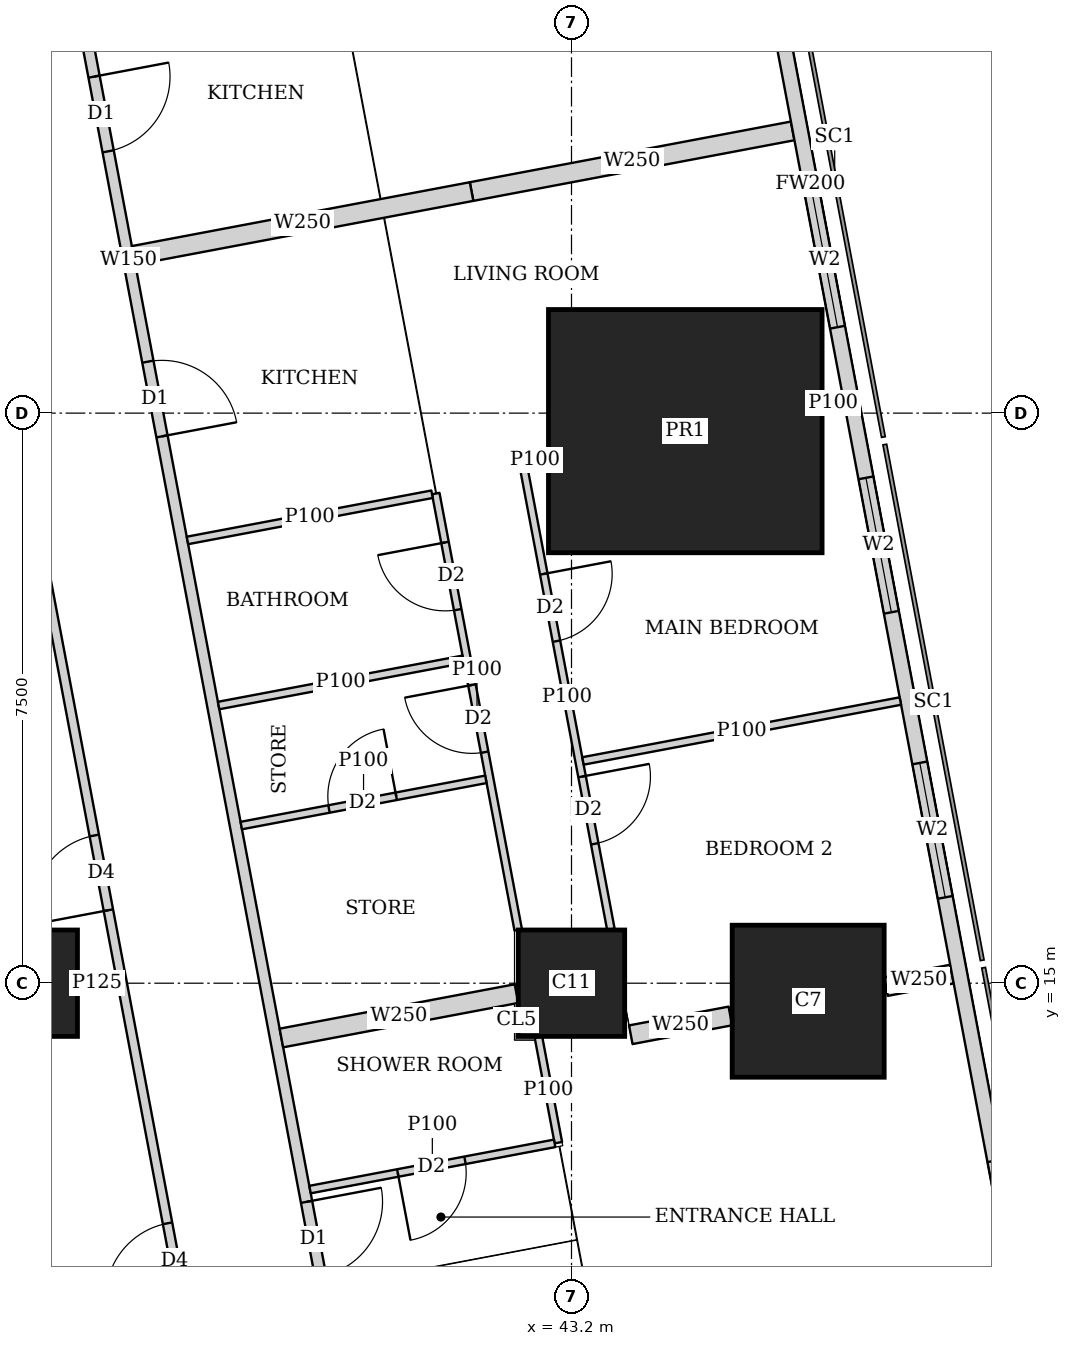
"""IFC4 building model, lengths in metres.
Left out: names, types, materials, properties, quantities, classifications, styles, units other than length and angle.
Written with IfcOpenShell. Run it as: python <this file> out.ifc"""

import sys

from ifc_helpers import new_model, si_unit, direction, frame, frame_2d, origin, origin_2d, place, context, subcontext, project, spatial, rectangle, extrude, element, fill, save


model = new_model("IFC4")
c1 = context("Model", 3, precision=1e-05, world=origin(), true_north=direction((0.0, 1.0)))
c2 = subcontext(c1, "Body", "Model", "MODEL_VIEW")
j1 = project(units=[si_unit("LENGTHUNIT", "METRE"), si_unit("PLANEANGLEUNIT", "RADIAN")], contexts=[c1])
p1 = place(None, origin())
s1 = spatial("IfcSite", under=j1, at=p1, CompositionType="ELEMENT")
p2 = place(p1, origin())
s2 = spatial("IfcBuilding", under=s1, at=p2, CompositionType="ELEMENT")
p3 = place(p2, frame((0.0, 0.0, 262.85)))
s3 = spatial("IfcBuildingStorey", under=s2, at=p3, CompositionType="ELEMENT", Elevation=262.85)
for number, where, z_axis, x_axis in (
    (1, (36.0, 15.0, 0.0), (0.0, 0.0, 1.0), (1.0, 0.0, 0.0)),
    (2, (43.2, 15.0, 0.0), (0.0, 0.0, 1.0), (1.0, 0.0, 0.0)),
):
    element("IfcColumn", number, at=place(p3, frame(where, z_axis=z_axis, x_axis=x_axis)), inside=s3, PredefinedType="COLUMN", context=c2, shape_type="SweptSolid", body=[
        extrude(rectangle(XDim=1.4, YDim=1.4, at=origin_2d()), origin(), (0.0, 0.0, 1.0), 3.75),
    ])
p4 = place(p3, frame((46.314, 14.763, 0.0), z_axis=(0.0, 0.0, 1.0), x_axis=(1.0, 0.0, 0.0)))
e3 = element("IfcColumn", 3, at=p4, inside=s3, PredefinedType="COLUMN", context=c2, shape_type="SweptSolid", body=[
    extrude(rectangle(XDim=2.0, YDim=2.0, at=origin_2d()), origin(), (0.0, 0.0, 1.0), 3.75),
])
p5 = place(p3, frame((44.697, 22.263, 0.0), z_axis=(0.0, 0.0, 1.0), x_axis=(1.0, 0.0, 0.0)))
e4 = element("IfcColumn", 4, at=p5, inside=s3, PredefinedType="COLUMN", context=c2, shape_type="SweptSolid", body=[
    extrude(rectangle(XDim=3.6, YDim=3.2, at=origin_2d()), origin(), (0.0, 0.0, 1.0), 3.75),
])
p6 = place(p3, frame((49.684, 7.832, 0.0), z_axis=(0.0, 0.0, 1.0), x_axis=(-0.185616669694, 0.982622232565, 0.0)))
e5 = element("IfcWall", 5, at=p6, inside=s3, PredefinedType="SOLIDWALL", context=c2, shape_type="SweptSolid", body=[
    extrude(rectangle(XDim=36.0, YDim=0.2, at=frame_2d((18.0, 0.0))), origin(), (0.0, 0.0, 1.0), 3.5),
])
p7 = place(p6, frame((2.518, 0.0, 0.9)))
e6 = element("IfcOpeningElement", 6, at=p7, cuts=e5, PredefinedType="OPENING", context=c2, shape_type="SweptSolid", body=[
    extrude(rectangle(XDim=2.4, YDim=1.5, at=frame_2d((1.2, 0.75))), frame((0.0, 0.11, 0.0), z_axis=(0.0, -1.0, 0.0), x_axis=(1.0, 0.0, 0.0)), (0.0, 0.0, 1.0), 0.22),
])
p8 = place(p6, frame((8.444, 0.0, 0.9)))
e7 = element("IfcOpeningElement", 7, at=p8, cuts=e5, PredefinedType="OPENING", context=c2, shape_type="SweptSolid", body=[
    extrude(rectangle(XDim=1.8, YDim=1.5, at=frame_2d((0.9, 0.75))), frame((0.0, 0.11, 0.0), z_axis=(0.0, -1.0, 0.0), x_axis=(1.0, 0.0, 0.0)), (0.0, 0.0, 1.0), 0.22),
])
p9 = place(p6, frame((12.261, 0.0, 0.9)))
e8 = element("IfcOpeningElement", 8, at=p9, cuts=e5, PredefinedType="OPENING", context=c2, shape_type="SweptSolid", body=[
    extrude(rectangle(XDim=1.8, YDim=1.5, at=frame_2d((0.9, 0.75))), frame((0.0, 0.11, 0.0), z_axis=(0.0, -1.0, 0.0), x_axis=(1.0, 0.0, 0.0)), (0.0, 0.0, 1.0), 0.22),
])
p10 = place(p6, frame((16.078, 0.0, 0.9)))
e9 = element("IfcOpeningElement", 9, at=p10, cuts=e5, PredefinedType="OPENING", context=c2, shape_type="SweptSolid", body=[
    extrude(rectangle(XDim=1.8, YDim=1.5, at=frame_2d((0.9, 0.75))), frame((0.0, 0.11, 0.0), z_axis=(0.0, -1.0, 0.0), x_axis=(1.0, 0.0, 0.0)), (0.0, 0.0, 1.0), 0.22),
])
p11 = place(p6, frame((19.894, 0.0, 0.9)))
e10 = element("IfcOpeningElement", 10, at=p11, cuts=e5, PredefinedType="OPENING", context=c2, shape_type="SweptSolid", body=[
    extrude(rectangle(XDim=1.8, YDim=1.5, at=frame_2d((0.9, 0.75))), frame((0.0, 0.11, 0.0), z_axis=(0.0, -1.0, 0.0), x_axis=(1.0, 0.0, 0.0)), (0.0, 0.0, 1.0), 0.22),
])
p12 = place(p6, frame((23.71, 0.0, 0.9)))
e11 = element("IfcOpeningElement", 11, at=p12, cuts=e5, PredefinedType="OPENING", context=c2, shape_type="SweptSolid", body=[
    extrude(rectangle(XDim=1.8, YDim=1.5, at=frame_2d((0.9, 0.75))), frame((0.0, 0.11, 0.0), z_axis=(0.0, -1.0, 0.0), x_axis=(1.0, 0.0, 0.0)), (0.0, 0.0, 1.0), 0.22),
])
p13 = place(p6, frame((27.526, 0.0, 0.9)))
e12 = element("IfcOpeningElement", 12, at=p13, cuts=e5, PredefinedType="OPENING", context=c2, shape_type="SweptSolid", body=[
    extrude(rectangle(XDim=1.8, YDim=1.5, at=frame_2d((0.9, 0.75))), frame((0.0, 0.11, 0.0), z_axis=(0.0, -1.0, 0.0), x_axis=(1.0, 0.0, 0.0)), (0.0, 0.0, 1.0), 0.22),
])
p14 = place(p6, frame((32.046, 0.0, 0.9)))
e13 = element("IfcOpeningElement", 13, at=p14, cuts=e5, PredefinedType="OPENING", context=c2, shape_type="SweptSolid", body=[
    extrude(rectangle(XDim=1.8, YDim=1.5, at=frame_2d((0.9, 0.75))), frame((0.0, 0.11, 0.0), z_axis=(0.0, -1.0, 0.0), x_axis=(1.0, 0.0, 0.0)), (0.0, 0.0, 1.0), 0.22),
])
p15 = place(p3, frame((34.036, 42.186, 0.0), z_axis=(0.0, 0.0, 1.0), x_axis=(0.185593518645, -0.9826266055, 0.0)))
e14 = element("IfcWall", 14, at=p15, inside=s3, PredefinedType="SOLIDWALL", context=c2, shape_type="SweptSolid", body=[
    extrude(rectangle(XDim=35.961, YDim=0.15, at=frame_2d((17.98, 0.0))), origin(), (0.0, 0.0, 1.0), 2.5),
])
p16 = place(p15, frame((15.529, 0.0, 0.0)))
e15 = element("IfcOpeningElement", 15, at=p16, cuts=e14, PredefinedType="OPENING", context=c2, shape_type="SweptSolid", body=[
    extrude(rectangle(XDim=1.0, YDim=2.1, at=frame_2d((0.5, 1.05))), frame((0.0, 0.085, 0.0), z_axis=(0.0, -1.0, 0.0), x_axis=(1.0, 0.0, 0.0)), (0.0, 0.0, 1.0), 0.17),
])
p17 = place(p15, frame((19.345, 0.0, 0.0)))
e16 = element("IfcOpeningElement", 16, at=p17, cuts=e14, PredefinedType="OPENING", context=c2, shape_type="SweptSolid", body=[
    extrude(rectangle(XDim=1.0, YDim=2.1, at=frame_2d((0.5, 1.05))), frame((0.0, 0.085, 0.0), z_axis=(0.0, -1.0, 0.0), x_axis=(1.0, 0.0, 0.0)), (0.0, 0.0, 1.0), 0.17),
])
p18 = place(p15, frame((30.594, 0.0, 0.0)))
e17 = element("IfcOpeningElement", 17, at=p18, cuts=e14, PredefinedType="OPENING", context=c2, shape_type="SweptSolid", body=[
    extrude(rectangle(XDim=1.0, YDim=2.1, at=frame_2d((0.5, 1.05))), frame((0.0, 0.085, 0.0), z_axis=(0.0, -1.0, 0.0), x_axis=(1.0, 0.0, 0.0)), (0.0, 0.0, 1.0), 0.17),
])
p19 = place(p3, frame((42.566, 21.809, 0.0), z_axis=(0.0, 0.0, 1.0), x_axis=(0.185613526435, -0.98262282632, 0.0)))
e18 = element("IfcWall", 18, at=p19, inside=s3, PredefinedType="PARTITIONING", context=c2, shape_type="SweptSolid", body=[
    extrude(rectangle(XDim=6.207, YDim=0.1, at=frame_2d((3.104, 0.0))), origin(), (0.0, 0.0, 1.0), 2.5),
])
p20 = place(p19, frame((1.45, 0.0, 0.0)))
e19 = element("IfcOpeningElement", 19, at=p20, cuts=e18, PredefinedType="OPENING", context=c2, shape_type="SweptSolid", body=[
    extrude(rectangle(XDim=0.9, YDim=2.1, at=frame_2d((0.45, 1.05))), frame((0.0, 0.06, 0.0), z_axis=(0.0, -1.0, 0.0), x_axis=(1.0, 0.0, 0.0)), (0.0, 0.0, 1.0), 0.12),
])
p21 = place(p19, frame((4.163, 0.0, 0.0)))
e20 = element("IfcOpeningElement", 20, at=p21, cuts=e18, PredefinedType="OPENING", context=c2, shape_type="SweptSolid", body=[
    extrude(rectangle(XDim=0.9, YDim=2.1, at=frame_2d((0.45, 1.05))), frame((0.0, 0.06, 0.0), z_axis=(0.0, -1.0, 0.0), x_axis=(1.0, 0.0, 0.0)), (0.0, 0.0, 1.0), 0.12),
])
p22 = place(p3, frame((41.414, 21.442, 0.0), z_axis=(0.0, 0.0, 1.0), x_axis=(0.185698675093, -0.982606738257, 0.0)))
e21 = element("IfcWall", 21, at=p22, inside=s3, PredefinedType="PARTITIONING", context=c2, shape_type="SweptSolid", body=[
    extrude(rectangle(XDim=5.843, YDim=0.1, at=frame_2d((2.921, 0.0))), origin(), (0.0, 0.0, 1.0), 3.5),
])
p23 = place(p22, frame((0.655, 0.0, 0.0)))
e22 = element("IfcOpeningElement", 22, at=p23, cuts=e21, PredefinedType="OPENING", context=c2, shape_type="SweptSolid", body=[
    extrude(rectangle(XDim=0.9, YDim=2.1, at=frame_2d((0.45, 1.05))), frame((0.0, 0.06, 0.0), z_axis=(0.0, -1.0, 0.0), x_axis=(1.0, 0.0, 0.0)), (0.0, 0.0, 1.0), 0.12),
])
p24 = place(p22, frame((2.563, 0.0, 0.0)))
e23 = element("IfcOpeningElement", 23, at=p24, cuts=e21, PredefinedType="OPENING", context=c2, shape_type="SweptSolid", body=[
    extrude(rectangle(XDim=0.9, YDim=2.1, at=frame_2d((0.45, 1.05))), frame((0.0, 0.06, 0.0), z_axis=(0.0, -1.0, 0.0), x_axis=(1.0, 0.0, 0.0)), (0.0, 0.0, 1.0), 0.12),
])
p25 = place(p3, frame((46.782, 22.657, 0.0), z_axis=(0.0, 0.0, 1.0), x_axis=(-0.982574553168, -0.185868898601, 0.0)))
e24 = element("IfcWall", 24, at=p25, inside=s3, PredefinedType="PARTITIONING", context=c2, shape_type="SweptSolid", body=[
    extrude(rectangle(XDim=0.28, YDim=0.1, at=frame_2d((0.14, 0.0))), origin(), (0.0, 0.0, 1.0), 3.5),
])
p26 = place(p3, frame((42.887, 21.921, 0.0), z_axis=(0.0, 0.0, 1.0), x_axis=(-0.982274918032, -0.187445953293, 0.0)))
e25 = element("IfcWall", 25, at=p26, inside=s3, PredefinedType="PARTITIONING", context=c2, shape_type="SweptSolid", body=[
    extrude(rectangle(XDim=0.336, YDim=0.1, at=frame_2d((0.168, 0.0))), origin(), (0.0, 0.0, 1.0), 2.5),
])
p27 = place(p3, frame((47.527, 18.712, 0.0), z_axis=(0.0, 0.0, 1.0), x_axis=(-0.982665405803, -0.185387972203, 0.0)))
e26 = element("IfcWall", 26, at=p27, inside=s3, PredefinedType="PARTITIONING", context=c2, shape_type="SweptSolid", body=[
    extrude(rectangle(XDim=4.25, YDim=0.1, at=frame_2d((2.125, 0.0))), origin(), (0.0, 0.0, 1.0), 2.5),
])
p28 = place(p3, frame((41.365, 21.433, 0.0), z_axis=(0.0, 0.0, 1.0), x_axis=(-0.982607026909, -0.185697147715, 0.0)))
e27 = element("IfcWall", 27, at=p28, inside=s3, PredefinedType="PARTITIONING", context=c2, shape_type="SweptSolid", body=[
    extrude(rectangle(XDim=3.275, YDim=0.1, at=frame_2d((1.637, 0.0))), origin(), (0.0, 0.0, 1.0), 3.5),
])
p29 = place(p3, frame((42.073, 17.682, 0.0), z_axis=(0.0, 0.0, 1.0), x_axis=(-0.982620626894, -0.185625169636, 0.0)))
e28 = element("IfcWall", 28, at=p29, inside=s3, PredefinedType="PARTITIONING", context=c2, shape_type="SweptSolid", body=[
    extrude(rectangle(XDim=3.275, YDim=0.1, at=frame_2d((1.637, 0.0))), origin(), (0.0, 0.0, 1.0), 3.5),
])
p30 = place(p29, frame((1.2, 0.0, 0.0)))
e29 = element("IfcOpeningElement", 29, at=p30, cuts=e28, PredefinedType="OPENING", context=c2, shape_type="SweptSolid", body=[
    extrude(rectangle(XDim=0.9, YDim=2.1, at=frame_2d((0.45, 1.05))), frame((0.0, 0.06, 0.0), z_axis=(0.0, -1.0, 0.0), x_axis=(1.0, 0.0, 0.0)), (0.0, 0.0, 1.0), 0.12),
])
p31 = place(p3, frame((41.775, 19.261, 0.0), z_axis=(0.0, 0.0, 1.0), x_axis=(-0.982620626894, -0.185625169636, 0.0)))
e30 = element("IfcWall", 30, at=p31, inside=s3, PredefinedType="PARTITIONING", context=c2, shape_type="SweptSolid", body=[
    extrude(rectangle(XDim=3.275, YDim=0.1, at=frame_2d((1.637, 0.0))), origin(), (0.0, 0.0, 1.0), 3.5),
])
p32 = place(p3, frame((46.11, 26.213, 0.0), z_axis=(0.0, 0.0, 1.0), x_axis=(-0.982633535512, -0.185556823879, 0.0)))
e31 = element("IfcWall", 31, at=p32, inside=s3, PredefinedType="SOLIDWALL", context=c2, shape_type="SweptSolid", body=[
    extrude(rectangle(XDim=4.3, YDim=0.25, at=frame_2d((2.15, 0.0))), origin(), (0.0, 0.0, 1.0), 2.5),
])
p33 = place(p3, frame((41.885, 25.415, 0.0), z_axis=(0.0, 0.0, 1.0), x_axis=(-0.982612837616, -0.185666398014, 0.0)))
e32 = element("IfcWall", 32, at=p33, inside=s3, PredefinedType="SOLIDWALL", context=c2, shape_type="SweptSolid", body=[
    extrude(rectangle(XDim=4.525, YDim=0.25, at=frame_2d((2.262, 0.0))), origin(), (0.0, 0.0, 1.0), 3.5),
])
p34 = place(p3, frame((42.765, 14.29, 0.0), z_axis=(0.0, 0.0, 1.0), x_axis=(0.185634589628, -0.982618847333, 0.0)))
e33 = element("IfcWall", 33, at=p34, inside=s3, PredefinedType="PARTITIONING", context=c2, shape_type="SweptSolid", body=[
    extrude(rectangle(XDim=1.413, YDim=0.1, at=frame_2d((0.706, 0.0))), origin(), (0.0, 0.0, 1.0), 3.5),
])
p35 = place(p3, frame((42.978, 12.893, 0.0), z_axis=(0.0, 0.0, 1.0), x_axis=(-0.982607026909, -0.185697147715, 0.0)))
e34 = element("IfcWall", 34, at=p35, inside=s3, PredefinedType="PARTITIONING", context=c2, shape_type="SweptSolid", body=[
    extrude(rectangle(XDim=3.275, YDim=0.1, at=frame_2d((1.637, 0.0))), origin(), (0.0, 0.0, 1.0), 3.5),
])
p36 = place(p35, frame((1.2, 0.0, 0.0)))
e35 = element("IfcOpeningElement", 35, at=p36, cuts=e34, PredefinedType="OPENING", context=c2, shape_type="SweptSolid", body=[
    extrude(rectangle(XDim=0.9, YDim=2.1, at=frame_2d((0.45, 1.05))), frame((0.0, 0.06, 0.0), z_axis=(0.0, -1.0, 0.0), x_axis=(1.0, 0.0, 0.0)), (0.0, 0.0, 1.0), 0.12),
])
p37 = place(p3, frame((48.206, 15.12, 0.0), z_axis=(0.0, 0.0, 1.0), x_axis=(-0.982608419258, -0.185689780017, 0.0)))
e36 = element("IfcWall", 36, at=p37, inside=s3, PredefinedType="SOLIDWALL", context=c2, shape_type="SweptSolid", body=[
    extrude(rectangle(XDim=0.884, YDim=0.25, at=frame_2d((0.442, 0.0))), origin(), (0.0, 0.0, 1.0), 3.5),
])
p38 = place(p3, frame((45.29, 14.569, 0.0), z_axis=(0.0, 0.0, 1.0), x_axis=(-0.982676759201, -0.185327782391, 0.0)))
e37 = element("IfcWall", 37, at=p38, inside=s3, PredefinedType="SOLIDWALL", context=c2, shape_type="SweptSolid", body=[
    extrude(rectangle(XDim=1.333, YDim=0.25, at=frame_2d((0.667, 0.0))), origin(), (0.0, 0.0, 1.0), 3.5),
])
p39 = place(p3, frame((42.476, 14.863, 0.0), z_axis=(0.0, 0.0, 1.0), x_axis=(-0.982638716117, -0.185529387398, 0.0)))
e38 = element("IfcWall", 38, at=p39, inside=s3, PredefinedType="SOLIDWALL", context=c2, shape_type="SweptSolid", body=[
    extrude(rectangle(XDim=3.148, YDim=0.25, at=frame_2d((1.574, 0.0))), origin(), (0.0, 0.0, 1.0), 3.5),
])
p40 = place(p3, frame((38.202, 10.163, 0.0), z_axis=(0.0, 0.0, 1.0), x_axis=(-0.185610321132, 0.982623431783, 0.0)))
e39 = element("IfcWall", 39, at=p40, inside=s3, PredefinedType="PARTITIONING", context=c2, shape_type="SweptSolid", body=[
    extrude(rectangle(XDim=25.111, YDim=0.125, at=frame_2d((12.556, 0.0))), origin(), (0.0, 0.0, 1.0), 2.5),
])
p41 = place(p40, frame((0.708, 0.0, 0.0)))
e40 = element("IfcOpeningElement", 40, at=p41, cuts=e39, PredefinedType="OPENING", context=c2, shape_type="SweptSolid", body=[
    extrude(rectangle(XDim=1.0, YDim=2.1, at=frame_2d((0.5, 1.05))), frame((0.0, 0.073, 0.0), z_axis=(0.0, -1.0, 0.0), x_axis=(1.0, 0.0, 0.0)), (0.0, 0.0, 1.0), 0.145),
])
p42 = place(p40, frame((5.9, 0.0, 0.0)))
e41 = element("IfcOpeningElement", 41, at=p42, cuts=e39, PredefinedType="OPENING", context=c2, shape_type="SweptSolid", body=[
    extrude(rectangle(XDim=1.0, YDim=2.1, at=frame_2d((0.5, 1.05))), frame((0.0, 0.073, 0.0), z_axis=(0.0, -1.0, 0.0), x_axis=(1.0, 0.0, 0.0)), (0.0, 0.0, 1.0), 0.145),
])
p43 = place(p40, frame((13.378, 0.0, 0.0)))
e42 = element("IfcOpeningElement", 42, at=p43, cuts=e39, PredefinedType="OPENING", context=c2, shape_type="SweptSolid", body=[
    extrude(rectangle(XDim=1.0, YDim=2.1, at=frame_2d((0.5, 1.05))), frame((0.0, 0.073, 0.0), z_axis=(0.0, -1.0, 0.0), x_axis=(1.0, 0.0, 0.0)), (0.0, 0.0, 1.0), 0.145),
])
p44 = place(p40, frame((17.194, 0.0, 0.0)))
e43 = element("IfcOpeningElement", 43, at=p44, cuts=e39, PredefinedType="OPENING", context=c2, shape_type="SweptSolid", body=[
    extrude(rectangle(XDim=1.0, YDim=2.1, at=frame_2d((0.5, 1.05))), frame((0.0, 0.073, 0.0), z_axis=(0.0, -1.0, 0.0), x_axis=(1.0, 0.0, 0.0)), (0.0, 0.0, 1.0), 0.145),
])
p45 = place(p40, frame((21.15, 0.0, 0.0)))
e44 = element("IfcOpeningElement", 44, at=p45, cuts=e39, PredefinedType="OPENING", context=c2, shape_type="SweptSolid", body=[
    extrude(rectangle(XDim=1.0, YDim=2.1, at=frame_2d((0.5, 1.05))), frame((0.0, 0.073, 0.0), z_axis=(0.0, -1.0, 0.0), x_axis=(1.0, 0.0, 0.0)), (0.0, 0.0, 1.0), 0.145),
])
p46 = place(p3, frame((36.701, 15.0, 0.0), z_axis=(0.0, 0.0, 1.0), x_axis=(1.0, 0.0, 0.0)))
e45 = element("IfcWall", 45, at=p46, inside=s3, PredefinedType="PARTITIONING", context=c2, shape_type="SweptSolid", body=[
    extrude(rectangle(XDim=0.512, YDim=0.125, at=frame_2d((0.256, 0.0))), origin(), (0.0, 0.0, 1.0), 3.5),
])
p47 = place(p8, origin())
e46 = element("IfcWindow", 46, at=p47, inside=s3, PartitioningType="SINGLE_PANEL", PredefinedType="WINDOW", context=c2, shape_type="SweptSolid", body=[
    extrude(rectangle(XDim=1.8, YDim=1.5, at=frame_2d((0.9, 0.75))), frame((0.0, 0.03, 0.0), z_axis=(0.0, -1.0, 0.0), x_axis=(1.0, 0.0, 0.0)), (0.0, 0.0, 1.0), 0.06),
])
fill(e7, e46)
p48 = place(p9, origin())
e47 = element("IfcWindow", 47, at=p48, inside=s3, PartitioningType="SINGLE_PANEL", PredefinedType="WINDOW", context=c2, shape_type="SweptSolid", body=[
    extrude(rectangle(XDim=1.8, YDim=1.5, at=frame_2d((0.9, 0.75))), frame((0.0, 0.03, 0.0), z_axis=(0.0, -1.0, 0.0), x_axis=(1.0, 0.0, 0.0)), (0.0, 0.0, 1.0), 0.06),
])
fill(e8, e47)
p49 = place(p10, origin())
e48 = element("IfcWindow", 48, at=p49, inside=s3, PartitioningType="SINGLE_PANEL", PredefinedType="WINDOW", context=c2, shape_type="SweptSolid", body=[
    extrude(rectangle(XDim=1.8, YDim=1.5, at=frame_2d((0.9, 0.75))), frame((0.0, 0.03, 0.0), z_axis=(0.0, -1.0, 0.0), x_axis=(1.0, 0.0, 0.0)), (0.0, 0.0, 1.0), 0.06),
])
fill(e9, e48)
p50 = place(p16, origin())
e49 = element("IfcDoor", 49, at=p50, inside=s3, OperationType="SINGLE_SWING_LEFT", PredefinedType="DOOR", context=c2, shape_type="SweptSolid", body=[
    extrude(rectangle(XDim=1.0, YDim=2.1, at=frame_2d((0.5, 1.05))), frame((0.0, 0.025, 0.0), z_axis=(0.0, -1.0, 0.0), x_axis=(1.0, 0.0, 0.0)), (0.0, 0.0, 1.0), 0.05),
])
fill(e15, e49)
p51 = place(p20, origin())
e50 = element("IfcDoor", 50, at=p51, inside=s3, OperationType="SINGLE_SWING_LEFT", PredefinedType="DOOR", context=c2, shape_type="SweptSolid", body=[
    extrude(rectangle(XDim=0.9, YDim=2.1, at=frame_2d((0.45, 1.05))), frame((0.0, 0.025, 0.0), z_axis=(0.0, -1.0, 0.0), x_axis=(1.0, 0.0, 0.0)), (0.0, 0.0, 1.0), 0.05),
])
fill(e19, e50)
p52 = place(p21, origin())
e51 = element("IfcDoor", 51, at=p52, inside=s3, OperationType="SINGLE_SWING_LEFT", PredefinedType="DOOR", context=c2, shape_type="SweptSolid", body=[
    extrude(rectangle(XDim=0.9, YDim=2.1, at=frame_2d((0.45, 1.05))), frame((0.0, 0.025, 0.0), z_axis=(0.0, -1.0, 0.0), x_axis=(1.0, 0.0, 0.0)), (0.0, 0.0, 1.0), 0.05),
])
fill(e20, e51)
p53 = place(p23, origin())
e52 = element("IfcDoor", 52, at=p53, inside=s3, OperationType="SINGLE_SWING_RIGHT", PredefinedType="DOOR", context=c2, shape_type="SweptSolid", body=[
    extrude(rectangle(XDim=0.9, YDim=2.1, at=frame_2d((0.45, 1.05))), frame((0.0, 0.025, 0.0), z_axis=(0.0, -1.0, 0.0), x_axis=(1.0, 0.0, 0.0)), (0.0, 0.0, 1.0), 0.05),
])
fill(e22, e52)
p54 = place(p24, origin())
e53 = element("IfcDoor", 53, at=p54, inside=s3, OperationType="SINGLE_SWING_RIGHT", PredefinedType="DOOR", context=c2, shape_type="SweptSolid", body=[
    extrude(rectangle(XDim=0.9, YDim=2.1, at=frame_2d((0.45, 1.05))), frame((0.0, 0.025, 0.0), z_axis=(0.0, -1.0, 0.0), x_axis=(1.0, 0.0, 0.0)), (0.0, 0.0, 1.0), 0.05),
])
fill(e23, e53)
p55 = place(p17, origin())
e54 = element("IfcDoor", 54, at=p55, inside=s3, OperationType="SINGLE_SWING_RIGHT", PredefinedType="DOOR", context=c2, shape_type="SweptSolid", body=[
    extrude(rectangle(XDim=1.0, YDim=2.1, at=frame_2d((0.5, 1.05))), frame((0.0, 0.025, 0.0), z_axis=(0.0, -1.0, 0.0), x_axis=(1.0, 0.0, 0.0)), (0.0, 0.0, 1.0), 0.05),
])
fill(e16, e54)
p56 = place(p36, origin())
e55 = element("IfcDoor", 55, at=p56, inside=s3, OperationType="SINGLE_SWING_RIGHT", PredefinedType="DOOR", context=c2, shape_type="SweptSolid", body=[
    extrude(rectangle(XDim=0.9, YDim=2.1, at=frame_2d((0.45, 1.05))), frame((0.0, 0.025, 0.0), z_axis=(0.0, -1.0, 0.0), x_axis=(1.0, 0.0, 0.0)), (0.0, 0.0, 1.0), 0.05),
])
fill(e35, e55)
p57 = place(p18, origin())
e56 = element("IfcDoor", 56, at=p57, inside=s3, OperationType="SINGLE_SWING_LEFT", PredefinedType="DOOR", context=c2, shape_type="SweptSolid", body=[
    extrude(rectangle(XDim=1.0, YDim=2.1, at=frame_2d((0.5, 1.05))), frame((0.0, 0.025, 0.0), z_axis=(0.0, -1.0, 0.0), x_axis=(1.0, 0.0, 0.0)), (0.0, 0.0, 1.0), 0.05),
])
fill(e17, e56)
p58 = place(p30, origin())
e57 = element("IfcDoor", 57, at=p58, inside=s3, OperationType="SINGLE_SWING_RIGHT", PredefinedType="DOOR", context=c2, shape_type="SweptSolid", body=[
    extrude(rectangle(XDim=0.9, YDim=2.1, at=frame_2d((0.45, 1.05))), frame((0.0, 0.025, 0.0), z_axis=(0.0, -1.0, 0.0), x_axis=(1.0, 0.0, 0.0)), (0.0, 0.0, 1.0), 0.05),
])
fill(e29, e57)
p59 = place(p41, origin())
e58 = element("IfcDoor", 58, at=p59, inside=s3, OperationType="SINGLE_SWING_LEFT", PredefinedType="DOOR", context=c2, shape_type="SweptSolid", body=[
    extrude(rectangle(XDim=1.0, YDim=2.1, at=frame_2d((0.5, 1.05))), frame((0.0, 0.025, 0.0), z_axis=(0.0, -1.0, 0.0), x_axis=(1.0, 0.0, 0.0)), (0.0, 0.0, 1.0), 0.05),
])
fill(e40, e58)
p60 = place(p42, origin())
e59 = element("IfcDoor", 59, at=p60, inside=s3, OperationType="SINGLE_SWING_LEFT", PredefinedType="DOOR", context=c2, shape_type="SweptSolid", body=[
    extrude(rectangle(XDim=1.0, YDim=2.1, at=frame_2d((0.5, 1.05))), frame((0.0, 0.025, 0.0), z_axis=(0.0, -1.0, 0.0), x_axis=(1.0, 0.0, 0.0)), (0.0, 0.0, 1.0), 0.05),
])
fill(e41, e59)
save(model, sys.argv[1])
